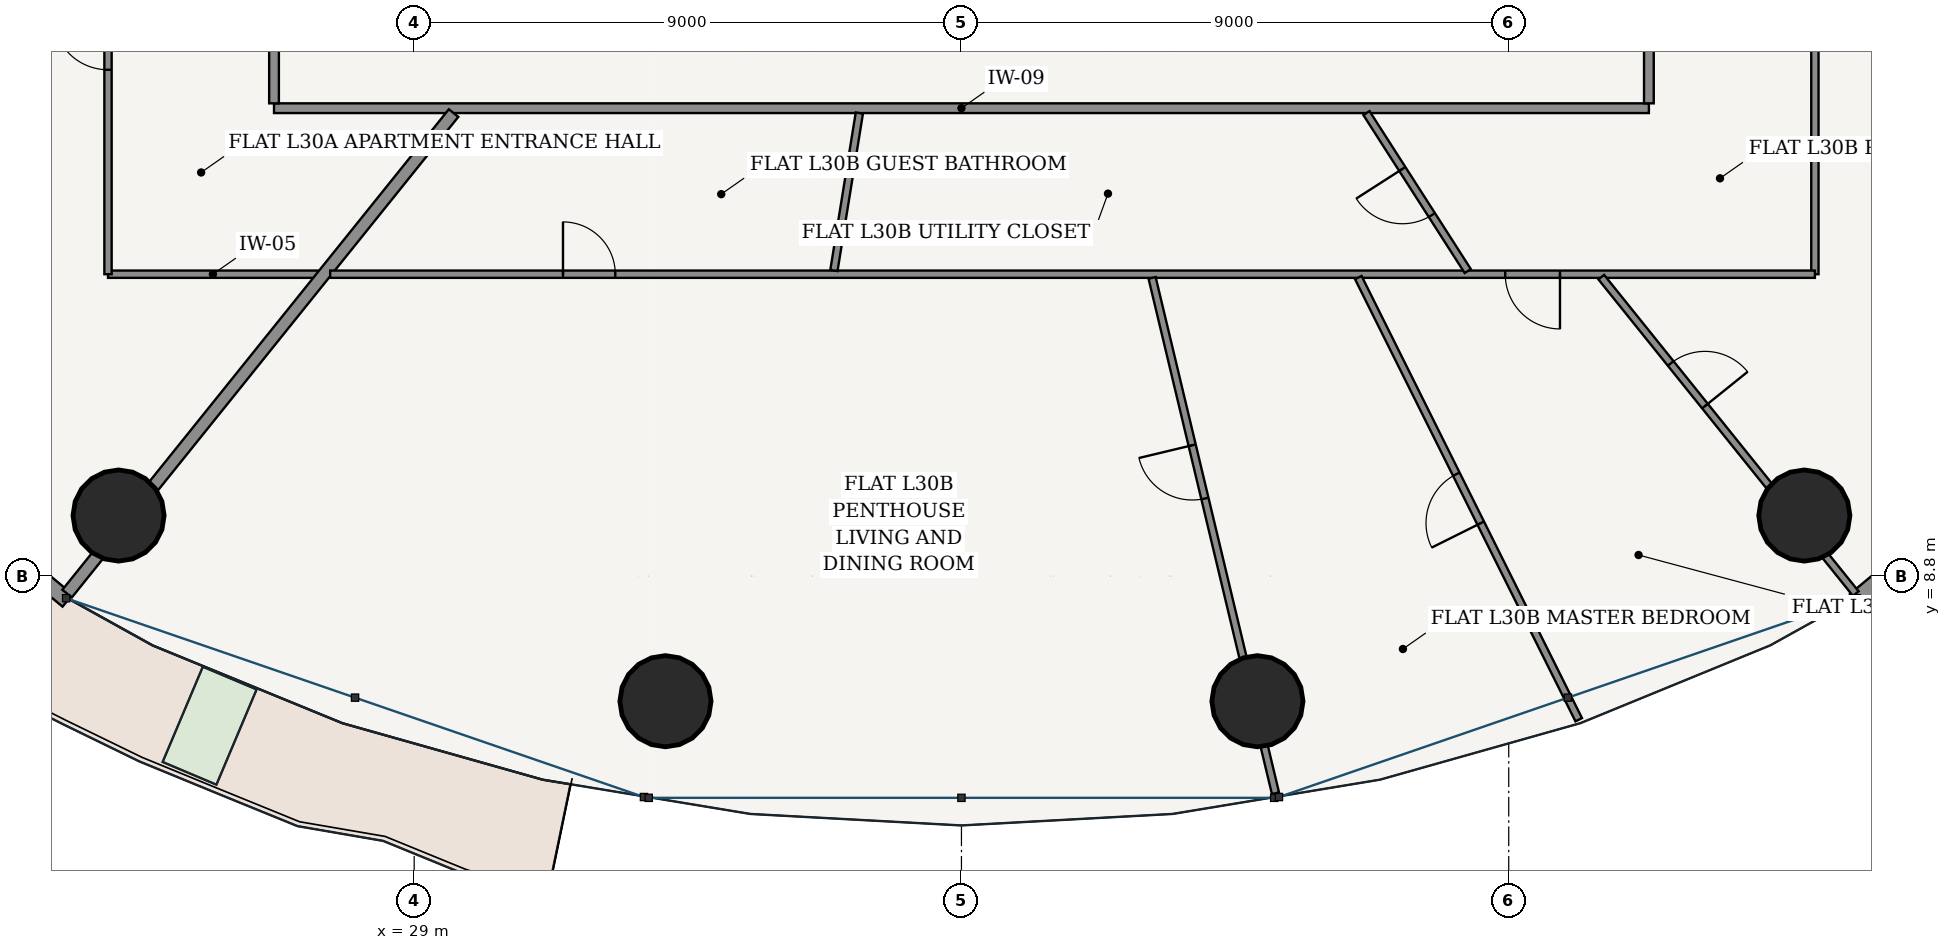
"""IFC4 building model, lengths in metres.
Left out: names, types, materials, properties, quantities, classifications, styles, units other than length and angle.
Written with IfcOpenShell. Run it as: python <this file> out.ifc"""

import sys

from ifc_helpers import new_model, si_unit, direction, frame, frame_2d, origin, origin_2d, place, context, subcontext, project, spatial, rectangle, hollow_circle, extrude, source, transform, mapped, element, fill, save


model = new_model("IFC4")
c1 = context("Model", 3, precision=1e-05, world=origin(), true_north=direction((-0.2419218956, 0.970295726276)))
c2 = subcontext(c1, "Body", "Model", "MODEL_VIEW")
j1 = project(units=[si_unit("LENGTHUNIT", "METRE"), si_unit("PLANEANGLEUNIT", "RADIAN")], contexts=[c1])
p1 = place(None, origin())
s1 = spatial("IfcSite", under=j1, at=p1, CompositionType="ELEMENT")
p2 = place(p1, origin())
s2 = spatial("IfcBuilding", under=s1, at=p2, CompositionType="ELEMENT")
p3 = place(p2, frame((0.0, 0.0, 115.8)))
s3 = spatial("IfcBuildingStorey", under=s2, at=p3, CompositionType="ELEMENT", Elevation=115.8)
for number, where, z_axis, x_axis in (
    (1, (24.138, 9.796, 0.0), (0.0, 0.0, 1.0), (1.0, 0.0, 0.0)),
    (2, (33.133, 6.743, 0.0), (0.0, 0.0, 1.0), (1.0, 0.0, 0.0)),
    (3, (42.867, 6.743, 0.0), (0.0, 0.0, 1.0), (1.0, 0.0, 0.0)),
    (4, (51.862, 9.796, 0.0), (0.0, 0.0, 1.0), (1.0, 0.0, 0.0)),
):
    element("IfcColumn", number, at=place(p3, frame(where, z_axis=z_axis, x_axis=x_axis)), inside=s3, PredefinedType="COLUMN", context=c2, shape_type="SweptSolid", body=[
        extrude(hollow_circle(Radius=0.75, WallThickness=0.045, at=origin_2d()), origin(), (0.0, 0.0, 1.0), 3.6),
    ])
p4 = place(p3, frame((15.846, 14.59, 0.0), z_axis=(0.0, 0.0, 1.0), x_axis=(0.769254958887, -0.638941944333, 0.0)))
e5 = element("IfcWall", 5, at=p4, inside=s3, PredefinedType="SOLIDWALL", context=c2, shape_type="SweptSolid", body=[
    extrude(rectangle(XDim=9.69, YDim=0.26, at=frame_2d((4.845, 0.0))), origin(), (0.0, 0.0, 1.0), 3.325),
])
p5 = place(p4, frame((4.17, 0.0, 0.0)))
e6 = element("IfcOpeningElement", 6, at=p5, cuts=e5, PredefinedType="OPENING", context=c2, shape_type="SweptSolid", body=[
    extrude(rectangle(XDim=1.35, YDim=2.2, at=frame_2d((0.675, 1.1))), frame((0.0, 0.14, 0.0), z_axis=(0.0, -1.0, 0.0), x_axis=(1.0, 0.0, 0.0)), (0.0, 0.0, 1.0), 0.28),
])
p6 = place(p3, frame((52.7, 8.398, 0.0), z_axis=(0.0, 0.0, 1.0), x_axis=(0.769254958887, 0.638941944333, 0.0)))
e7 = element("IfcWall", 7, at=p6, inside=s3, PredefinedType="SOLIDWALL", context=c2, shape_type="SweptSolid", body=[
    extrude(rectangle(XDim=9.69, YDim=0.28, at=frame_2d((4.845, 0.0))), origin(), (0.0, 0.0, 1.0), 3.325),
])
p7 = place(p6, frame((1.566, 0.0, 0.85)))
e8 = element("IfcOpeningElement", 8, at=p7, cuts=e7, PredefinedType="OPENING", context=c2, shape_type="SweptSolid", body=[
    extrude(rectangle(XDim=2.1, YDim=1.95, at=frame_2d((1.05, 0.975))), frame((0.0, 0.15, 0.0), z_axis=(0.0, -1.0, 0.0), x_axis=(1.0, 0.0, 0.0)), (0.0, 0.0, 1.0), 0.3),
])
p8 = place(p6, frame((6.023, 0.0, 0.85)))
e9 = element("IfcOpeningElement", 9, at=p8, cuts=e7, PredefinedType="OPENING", context=c2, shape_type="SweptSolid", body=[
    extrude(rectangle(XDim=2.1, YDim=1.95, at=frame_2d((1.05, 0.975))), frame((0.0, 0.15, 0.0), z_axis=(0.0, -1.0, 0.0), x_axis=(1.0, 0.0, 0.0)), (0.0, 0.0, 1.0), 0.3),
])
p9 = place(p3, frame((26.695, 16.495, 0.0), z_axis=(0.0, 0.0, 1.0), x_axis=(1.0, 0.0, 0.0)))
e10 = element("IfcWall", 10, at=p9, inside=s3, PredefinedType="PARTITIONING", context=c2, shape_type="SweptSolid", body=[
    extrude(rectangle(XDim=22.61, YDim=0.16, at=frame_2d((11.305, 0.0))), origin(), (0.0, 0.0, 1.0), 2.767),
])
p10 = place(p3, frame((26.695, 16.575, 0.0), z_axis=(0.0, 0.0, 1.0), x_axis=(0.0, 1.0, 0.0)))
e11 = element("IfcWall", 11, at=p10, inside=s3, PredefinedType="PARTITIONING", context=c2, shape_type="SweptSolid", body=[
    extrude(rectangle(XDim=20.45, YDim=0.16, at=frame_2d((10.225, 0.0))), origin(), (0.0, 0.0, 1.0), 2.767),
])
p11 = place(p10, frame((2.424, 0.0, 0.0)))
e12 = element("IfcOpeningElement", 12, at=p11, cuts=e11, PredefinedType="OPENING", context=c2, shape_type="SweptSolid", body=[
    extrude(rectangle(XDim=0.98, YDim=2.2, at=frame_2d((0.49, 1.1))), frame((0.0, 0.09, 0.0), z_axis=(0.0, -1.0, 0.0), x_axis=(1.0, 0.0, 0.0)), (0.0, 0.0, 1.0), 0.18),
])
p12 = place(p3, frame((49.305, 16.575, 0.0), z_axis=(0.0, 0.0, 1.0), x_axis=(0.0, 1.0, 0.0)))
e13 = element("IfcWall", 13, at=p12, inside=s3, PredefinedType="PARTITIONING", context=c2, shape_type="SweptSolid", body=[
    extrude(rectangle(XDim=20.45, YDim=0.16, at=frame_2d((10.225, 0.0))), origin(), (0.0, 0.0, 1.0), 2.767),
])
p13 = place(p12, frame((17.046, 0.0, 0.0)))
e14 = element("IfcOpeningElement", 14, at=p13, cuts=e13, PredefinedType="OPENING", context=c2, shape_type="SweptSolid", body=[
    extrude(rectangle(XDim=0.98, YDim=2.2, at=frame_2d((0.49, 1.1))), frame((0.0, 0.09, 0.0), z_axis=(0.0, -1.0, 0.0), x_axis=(1.0, 0.0, 0.0)), (0.0, 0.0, 1.0), 0.18),
])
p14 = place(p3, frame((27.415, 13.765, 0.0), z_axis=(0.0, 0.0, 1.0), x_axis=(-1.0, 0.0, 0.0)))
e15 = element("IfcWall", 15, at=p14, inside=s3, PredefinedType="PARTITIONING", context=c2, shape_type="SweptSolid", body=[
    extrude(rectangle(XDim=3.45, YDim=0.12, at=frame_2d((1.725, 0.0))), origin(), (0.0, 0.0, 1.0), 2.767),
])
p15 = place(p3, frame((23.965, 13.765, 0.0), z_axis=(0.0, 0.0, 1.0), x_axis=(0.0, 1.0, 0.0)))
e16 = element("IfcWall", 16, at=p15, inside=s3, PredefinedType="PARTITIONING", context=c2, shape_type="SweptSolid", body=[
    extrude(rectangle(XDim=26.07, YDim=0.12, at=frame_2d((13.035, 0.0))), origin(), (0.0, 0.0, 1.0), 2.767),
])
p16 = place(p15, frame((3.362, 0.0, 0.0)))
e17 = element("IfcOpeningElement", 17, at=p16, cuts=e16, PredefinedType="OPENING", context=c2, shape_type="SweptSolid", body=[
    extrude(rectangle(XDim=0.9, YDim=2.15, at=frame_2d((0.45, 1.075))), frame((0.0, 0.07, 0.0), z_axis=(0.0, -1.0, 0.0), x_axis=(1.0, 0.0, 0.0)), (0.0, 0.0, 1.0), 0.14),
])
p17 = place(p15, frame((13.924, 0.0, 0.0)))
e18 = element("IfcOpeningElement", 18, at=p17, cuts=e16, PredefinedType="OPENING", context=c2, shape_type="SweptSolid", body=[
    extrude(rectangle(XDim=0.9, YDim=2.15, at=frame_2d((0.45, 1.075))), frame((0.0, 0.07, 0.0), z_axis=(0.0, -1.0, 0.0), x_axis=(1.0, 0.0, 0.0)), (0.0, 0.0, 1.0), 0.14),
])
p18 = place(p3, frame((29.648, 16.415, 0.0), z_axis=(0.0, 0.0, 1.0), x_axis=(-0.626701127389, -0.779259710834, 0.0)))
e19 = element("IfcWall", 19, at=p18, inside=s3, PredefinedType="PARTITIONING", context=c2, shape_type="SweptSolid", body=[
    extrude(rectangle(XDim=10.141, YDim=0.2, at=frame_2d((5.071, 0.0))), origin(), (0.0, 0.0, 1.0), 2.767),
])
p19 = place(p3, frame((52.035, 39.835, 0.0), z_axis=(0.0, 0.0, 1.0), x_axis=(0.0, -1.0, 0.0)))
e20 = element("IfcWall", 20, at=p19, inside=s3, PredefinedType="PARTITIONING", context=c2, shape_type="SweptSolid", body=[
    extrude(rectangle(XDim=26.07, YDim=0.12, at=frame_2d((13.035, 0.0))), origin(), (0.0, 0.0, 1.0), 2.767),
])
p20 = place(p19, frame((3.362, 0.0, 0.0)))
e21 = element("IfcOpeningElement", 21, at=p20, cuts=e20, PredefinedType="OPENING", context=c2, shape_type="SweptSolid", body=[
    extrude(rectangle(XDim=0.9, YDim=2.15, at=frame_2d((0.45, 1.075))), frame((0.0, 0.07, 0.0), z_axis=(0.0, -1.0, 0.0), x_axis=(1.0, 0.0, 0.0)), (0.0, 0.0, 1.0), 0.14),
])
p21 = place(p19, frame((13.924, 0.0, 0.0)))
e22 = element("IfcOpeningElement", 22, at=p21, cuts=e20, PredefinedType="OPENING", context=c2, shape_type="SweptSolid", body=[
    extrude(rectangle(XDim=0.9, YDim=2.15, at=frame_2d((0.45, 1.075))), frame((0.0, 0.07, 0.0), z_axis=(0.0, -1.0, 0.0), x_axis=(1.0, 0.0, 0.0)), (0.0, 0.0, 1.0), 0.14),
])
p22 = place(p3, frame((52.035, 13.765, 0.0), z_axis=(0.0, 0.0, 1.0), x_axis=(-1.0, 0.0, 0.0)))
e23 = element("IfcWall", 23, at=p22, inside=s3, PredefinedType="PARTITIONING", context=c2, shape_type="SweptSolid", body=[
    extrude(rectangle(XDim=24.416, YDim=0.12, at=frame_2d((12.208, 0.0))), origin(), (0.0, 0.0, 1.0), 2.767),
])
p23 = place(p22, frame((4.192, 0.0, 0.0)))
e24 = element("IfcOpeningElement", 24, at=p23, cuts=e23, PredefinedType="OPENING", context=c2, shape_type="SweptSolid", body=[
    extrude(rectangle(XDim=0.9, YDim=2.15, at=frame_2d((0.45, 1.075))), frame((0.0, 0.07, 0.0), z_axis=(0.0, -1.0, 0.0), x_axis=(1.0, 0.0, 0.0)), (0.0, 0.0, 1.0), 0.14),
])
p24 = place(p22, frame((19.728, 0.0, 0.0)))
e25 = element("IfcOpeningElement", 25, at=p24, cuts=e23, PredefinedType="OPENING", context=c2, shape_type="SweptSolid", body=[
    extrude(rectangle(XDim=0.86, YDim=2.15, at=frame_2d((0.43, 1.075))), frame((0.0, 0.07, 0.0), z_axis=(0.0, -1.0, 0.0), x_axis=(1.0, 0.0, 0.0)), (0.0, 0.0, 1.0), 0.14),
])
p25 = place(p3, frame((41.135, 13.705, 0.0), z_axis=(0.0, 0.0, 1.0), x_axis=(0.23282725047, -0.97251810854, 0.0)))
e26 = element("IfcWall", 26, at=p25, inside=s3, PredefinedType="PARTITIONING", context=c2, shape_type="SweptSolid", body=[
    extrude(rectangle(XDim=8.715, YDim=0.12, at=frame_2d((4.357, 0.0))), origin(), (0.0, 0.0, 1.0), 2.767),
])
p26 = place(p25, frame((2.831, 0.0, 0.0)))
e27 = element("IfcOpeningElement", 27, at=p26, cuts=e26, PredefinedType="OPENING", context=c2, shape_type="SweptSolid", body=[
    extrude(rectangle(XDim=0.9, YDim=2.15, at=frame_2d((0.45, 1.075))), frame((0.0, 0.07, 0.0), z_axis=(0.0, -1.0, 0.0), x_axis=(1.0, 0.0, 0.0)), (0.0, 0.0, 1.0), 0.14),
])
p27 = place(p3, frame((44.526, 13.709, 0.0), z_axis=(0.0, 0.0, 1.0), x_axis=(0.446179583353, -0.894943450392, 0.0)))
e28 = element("IfcWall", 28, at=p27, inside=s3, PredefinedType="PARTITIONING", context=c2, shape_type="SweptSolid", body=[
    extrude(rectangle(XDim=8.125, YDim=0.12, at=frame_2d((4.062, 0.0))), origin(), (0.0, 0.0, 1.0), 2.767),
])
p28 = place(p27, frame((3.612, 0.0, 0.0)))
e29 = element("IfcOpeningElement", 29, at=p28, cuts=e28, PredefinedType="OPENING", context=c2, shape_type="SweptSolid", body=[
    extrude(rectangle(XDim=0.9, YDim=2.15, at=frame_2d((0.45, 1.075))), frame((0.0, 0.07, 0.0), z_axis=(0.0, -1.0, 0.0), x_axis=(1.0, 0.0, 0.0)), (0.0, 0.0, 1.0), 0.14),
])
p29 = place(p3, frame((48.522, 13.717, 0.0), z_axis=(0.0, 0.0, 1.0), x_axis=(0.626707979732, -0.77925419995, 0.0)))
e30 = element("IfcWall", 30, at=p29, inside=s3, PredefinedType="PARTITIONING", context=c2, shape_type="SweptSolid", body=[
    extrude(rectangle(XDim=6.679, YDim=0.12, at=frame_2d((3.339, 0.0))), origin(), (0.0, 0.0, 1.0), 2.767),
])
p30 = place(p29, frame((1.821, 0.0, 0.0)))
e31 = element("IfcOpeningElement", 31, at=p30, cuts=e30, PredefinedType="OPENING", context=c2, shape_type="SweptSolid", body=[
    extrude(rectangle(XDim=0.9, YDim=2.15, at=frame_2d((0.45, 1.075))), frame((0.0, 0.07, 0.0), z_axis=(0.0, -1.0, 0.0), x_axis=(1.0, 0.0, 0.0)), (0.0, 0.0, 1.0), 0.14),
])
p31 = place(p3, frame((52.089, 18.979, 0.0), z_axis=(0.0, 0.0, 1.0), x_axis=(0.874313476423, -0.485361664066, 0.0)))
e32 = element("IfcWall", 32, at=p31, inside=s3, PredefinedType="PARTITIONING", context=c2, shape_type="SweptSolid", body=[
    extrude(rectangle(XDim=9.066, YDim=0.12, at=frame_2d((4.533, 0.0))), origin(), (0.0, 0.0, 1.0), 2.767),
])
p32 = place(p3, frame((36.321, 16.415, 0.0), z_axis=(0.0, 0.0, 1.0), x_axis=(-0.159566101486, -0.9871872463, 0.0)))
e33 = element("IfcWall", 33, at=p32, inside=s3, PredefinedType="PARTITIONING", context=c2, shape_type="SweptSolid", body=[
    extrude(rectangle(XDim=2.623, YDim=0.12, at=frame_2d((1.311, 0.0))), origin(), (0.0, 0.0, 1.0), 3.325),
])
p33 = place(p3, frame((44.66, 16.415, 0.0), z_axis=(0.0, 0.0, 1.0), x_axis=(0.539825682796, -0.841776830397, 0.0)))
e34 = element("IfcWall", 34, at=p33, inside=s3, PredefinedType="PARTITIONING", context=c2, shape_type="SweptSolid", body=[
    extrude(rectangle(XDim=3.086, YDim=0.12, at=frame_2d((1.543, 0.0))), origin(), (0.0, 0.0, 1.0), 3.325),
])
p34 = place(p33, frame((1.093, 0.0, 0.0)))
e35 = element("IfcOpeningElement", 35, at=p34, cuts=e34, PredefinedType="OPENING", context=c2, shape_type="SweptSolid", body=[
    extrude(rectangle(XDim=0.9, YDim=2.15, at=frame_2d((0.45, 1.075))), frame((0.0, 0.07, 0.0), z_axis=(0.0, -1.0, 0.0), x_axis=(1.0, 0.0, 0.0)), (0.0, 0.0, 1.0), 0.14),
])
m1 = source(origin(), c2, "Body", "SweptSolid", [
    extrude(rectangle(XDim=0.9, YDim=2.15, at=frame_2d((0.45, 1.075))), frame((0.0, 0.025, 0.0), z_axis=(0.0, -1.0, 0.0), x_axis=(1.0, 0.0, 0.0)), (0.0, 0.0, 1.0), 0.05),
])
p35 = place(p16, origin())
e36 = element("IfcDoor", 36, at=p35, inside=s3, OperationType="SINGLE_SWING_RIGHT", PredefinedType="DOOR", context=c2, shape_type="MappedRepresentation", body=[
    mapped(m1, transform((0.0, 0.0, 0.0), scale=1.0)),
])
fill(e17, e36)
p36 = place(p23, origin())
e37 = element("IfcDoor", 37, at=p36, inside=s3, OperationType="SINGLE_SWING_LEFT", PredefinedType="DOOR", context=c2, shape_type="MappedRepresentation", body=[
    mapped(m1, transform((0.0, 0.0, 0.0), scale=1.0)),
])
fill(e24, e37)
p37 = place(p30, origin())
e38 = element("IfcDoor", 38, at=p37, inside=s3, OperationType="SINGLE_SWING_RIGHT", PredefinedType="DOOR", context=c2, shape_type="MappedRepresentation", body=[
    mapped(m1, transform((0.0, 0.0, 0.0), scale=1.0)),
])
fill(e31, e38)
p38 = place(p34, frame((0.9, 0.0, 0.0), z_axis=(0.0, 0.0, 1.0), x_axis=(-1.0, 0.0, 0.0)))
e39 = element("IfcDoor", 39, at=p38, inside=s3, OperationType="SINGLE_SWING_RIGHT", PredefinedType="DOOR", context=c2, shape_type="MappedRepresentation", body=[
    mapped(m1, transform((0.0, 0.0, 0.0), scale=1.0)),
])
fill(e35, e39)
p39 = place(p28, frame((0.9, 0.0, 0.0), z_axis=(0.0, 0.0, 1.0), x_axis=(-1.0, 0.0, 0.0)))
e40 = element("IfcDoor", 40, at=p39, inside=s3, OperationType="SINGLE_SWING_LEFT", PredefinedType="DOOR", context=c2, shape_type="MappedRepresentation", body=[
    mapped(m1, transform((0.0, 0.0, 0.0), scale=1.0)),
])
fill(e29, e40)
p40 = place(p26, frame((0.9, 0.0, 0.0), z_axis=(0.0, 0.0, 1.0), x_axis=(-1.0, 0.0, 0.0)))
e41 = element("IfcDoor", 41, at=p40, inside=s3, OperationType="SINGLE_SWING_RIGHT", PredefinedType="DOOR", context=c2, shape_type="MappedRepresentation", body=[
    mapped(m1, transform((0.0, 0.0, 0.0), scale=1.0)),
])
fill(e27, e41)
m2 = source(origin(), c2, "Body", "SweptSolid", [
    extrude(rectangle(XDim=0.86, YDim=2.15, at=frame_2d((0.43, 1.075))), frame((0.0, 0.025, 0.0), z_axis=(0.0, -1.0, 0.0), x_axis=(1.0, 0.0, 0.0)), (0.0, 0.0, 1.0), 0.05),
])
p41 = place(p24, frame((0.86, 0.0, 0.0), z_axis=(0.0, 0.0, 1.0), x_axis=(-1.0, 0.0, 0.0)))
e42 = element("IfcDoor", 42, at=p41, inside=s3, OperationType="SINGLE_SWING_LEFT", PredefinedType="DOOR", context=c2, shape_type="MappedRepresentation", body=[
    mapped(m2, transform((0.0, 0.0, 0.0), scale=1.0)),
])
fill(e25, e42)
save(model, sys.argv[1])
